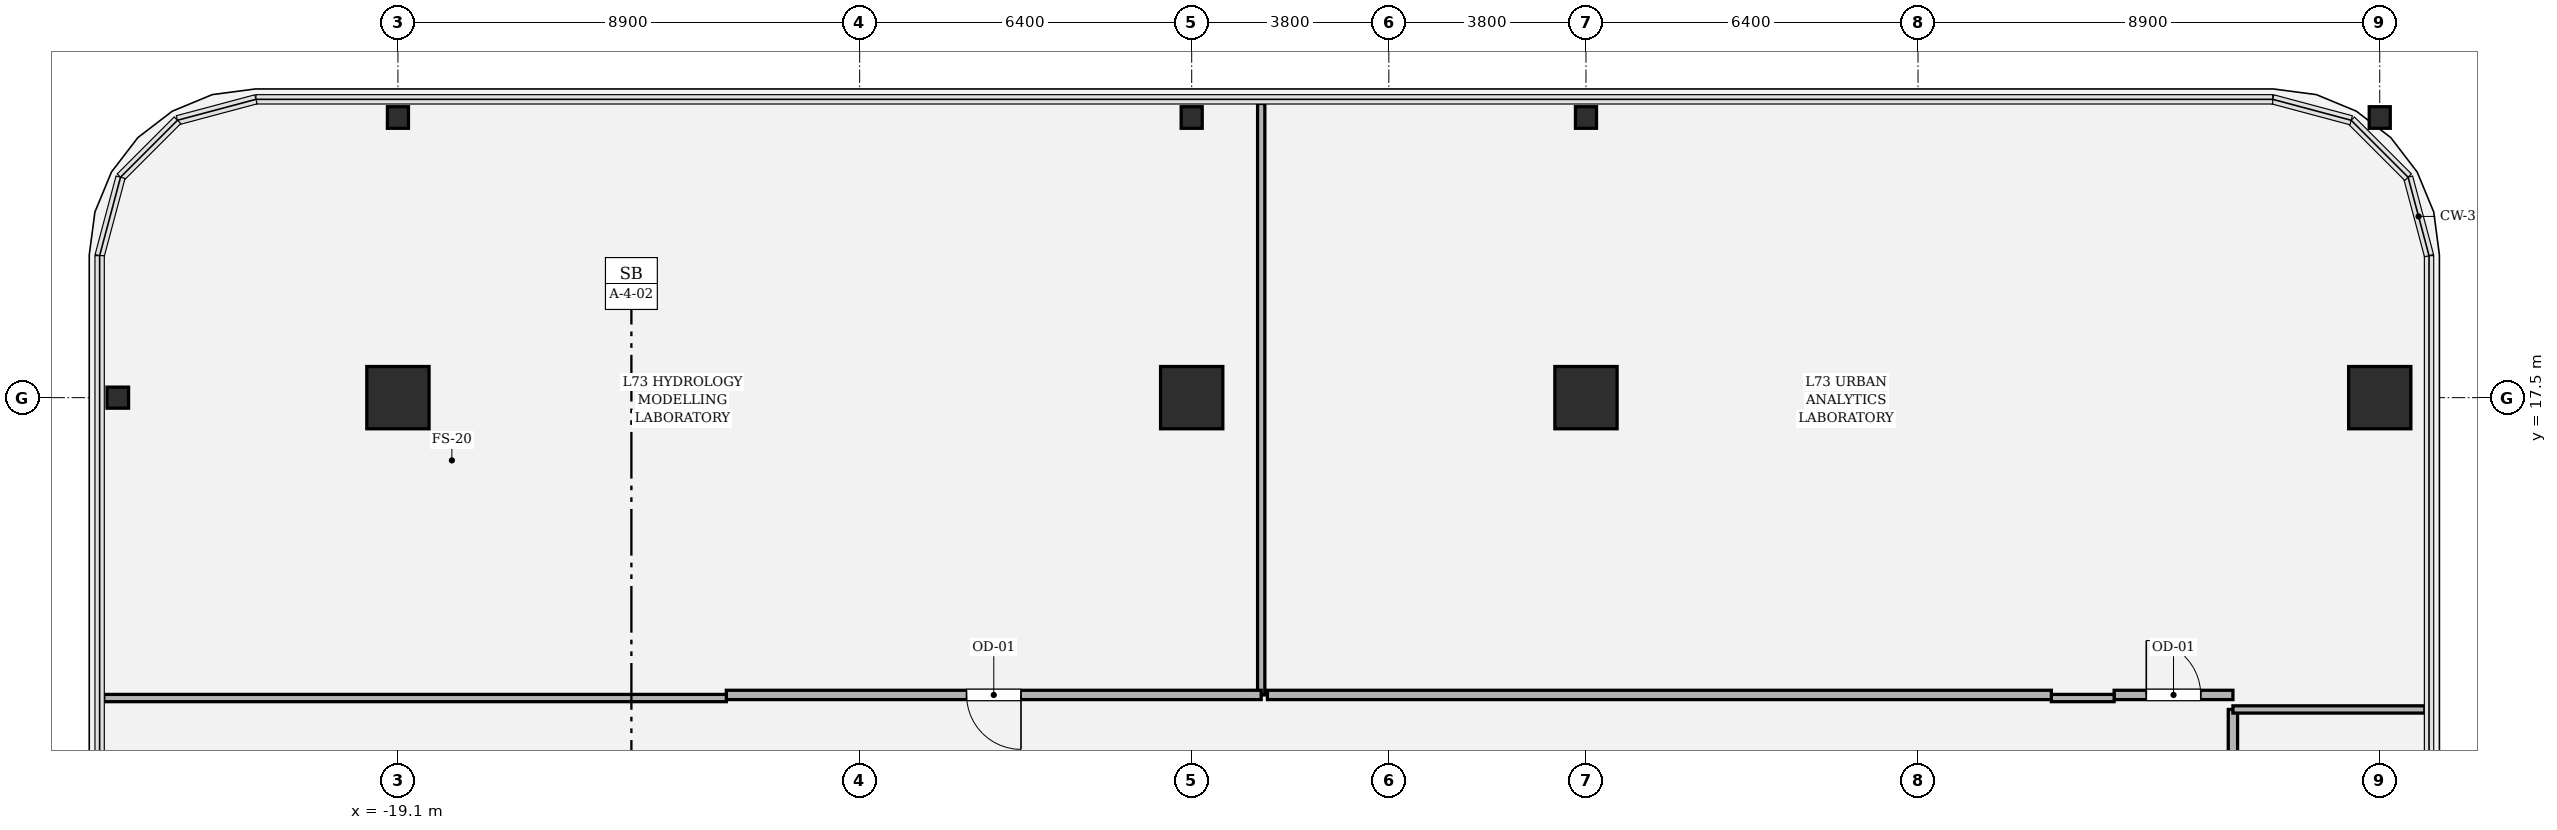
"""IFC4 building model, lengths in metres.
Left out: names, types, materials, properties, quantities, classifications, styles, units other than length and angle.
Written with IfcOpenShell. Run it as: python <this file> out.ifc"""

import sys

from ifc_helpers import new_model, si_unit, direction, frame, frame_2d, origin, origin_2d, place, context, subcontext, project, spatial, rectangle, hollow_rectangle, i_section, extrude, element, fill, save


model = new_model("IFC4")
c1 = context("Model", 3, precision=1e-05, world=origin(), true_north=direction((0.0, 1.0)))
c2 = subcontext(c1, "Body", "Model", "MODEL_VIEW")
j1 = project(units=[si_unit("LENGTHUNIT", "METRE"), si_unit("PLANEANGLEUNIT", "RADIAN")], contexts=[c1])
p1 = place(None, origin())
s1 = spatial("IfcSite", under=j1, at=p1, CompositionType="ELEMENT")
p2 = place(p1, origin())
s2 = spatial("IfcBuilding", under=s1, at=p2, CompositionType="ELEMENT")
p3 = place(p2, frame((0.0, 0.0, 309.0)))
s3 = spatial("IfcBuildingStorey", under=s2, at=p3, CompositionType="ELEMENT", Elevation=309.0)
for number, where, z_axis, x_axis in (
    (1, (19.1, 17.5, 0.0), (0.0, 0.0, 1.0), (1.0, 0.0, 0.0)),
    (2, (3.8, 17.5, 0.0), (0.0, 0.0, 1.0), (1.0, 0.0, 0.0)),
    (3, (-3.8, 17.5, 0.0), (0.0, 0.0, 1.0), (1.0, 0.0, 0.0)),
    (4, (-19.1, 17.5, 0.0), (0.0, 0.0, 1.0), (1.0, 0.0, 0.0)),
):
    element("IfcColumn", number, at=place(p3, frame(where, z_axis=z_axis, x_axis=x_axis)), inside=s3, PredefinedType="COLUMN", context=c2, shape_type="SweptSolid", body=[
        extrude(hollow_rectangle(XDim=1.2, YDim=1.2, WallThickness=0.035, at=origin_2d()), origin(), (0.0, 0.0, 1.0), 4.2),
    ])
for number, where, z_axis, x_axis in (
    (5, (-19.1, 22.9, 0.0), (0.0, 0.0, 1.0), (1.0, 0.0, 0.0)),
    (6, (-3.8, 22.9, 0.0), (0.0, 0.0, 1.0), (1.0, 0.0, 0.0)),
    (7, (3.8, 22.9, 0.0), (0.0, 0.0, 1.0), (1.0, 0.0, 0.0)),
    (8, (19.1, 22.9, 0.0), (0.0, 0.0, 1.0), (1.0, 0.0, 0.0)),
    (9, (-24.5, 17.5, 0.0), (0.0, 0.0, 1.0), (0.0, 1.0, 0.0)),
):
    element("IfcColumn", number, at=place(p3, frame(where, z_axis=z_axis, x_axis=x_axis)), inside=s3, PredefinedType="COLUMN", context=c2, shape_type="SweptSolid", body=[
        extrude(i_section(OverallWidth=0.406, OverallDepth=0.416, WebThickness=0.029, FlangeThickness=0.048, FilletRadius=0.018, at=origin_2d()), origin(), (0.0, 0.0, 1.0), 4.198),
    ])
p4 = place(p3, frame((16.27, -5.67, 0.0), z_axis=(0.0, 0.0, 1.0), x_axis=(0.0, 1.0, 0.0)))
e10 = element("IfcWall", 10, at=p4, inside=s3, PredefinedType="PARTITIONING", context=c2, shape_type="SweptSolid", body=[
    extrude(rectangle(XDim=17.16, YDim=0.18, at=frame_2d((8.58, 0.0))), origin(), (0.0, 0.0, 1.0), 3.394),
])
p5 = place(p4, frame((8.055, 0.0, 0.0)))
e11 = element("IfcOpeningElement", 11, at=p5, cuts=e10, PredefinedType="OPENING", context=c2, shape_type="SweptSolid", body=[
    extrude(rectangle(XDim=1.05, YDim=2.2, at=frame_2d((0.525, 1.1))), frame((0.0, 0.1, 0.0), z_axis=(0.0, -1.0, 0.0), x_axis=(1.0, 0.0, 0.0)), (0.0, 0.0, 1.0), 0.2),
])
p6 = place(p3, frame((16.27, 11.49, 0.0), z_axis=(0.0, 0.0, 1.0), x_axis=(1.0, 0.0, 0.0)))
e12 = element("IfcWall", 12, at=p6, inside=s3, PredefinedType="PARTITIONING", context=c2, shape_type="SweptSolid", body=[
    extrude(rectangle(XDim=3.7, YDim=0.14, at=frame_2d((1.85, 0.0))), origin(), (0.0, 0.0, 1.0), 3.394),
])
p7 = place(p3, frame((-2.46, 23.17, 0.0), z_axis=(0.0, 0.0, 1.0), x_axis=(0.0, -1.0, 0.0)))
e13 = element("IfcWall", 13, at=p7, inside=s3, PredefinedType="PARTITIONING", context=c2, shape_type="SweptSolid", body=[
    extrude(rectangle(XDim=11.4, YDim=0.14, at=frame_2d((5.7, 0.0))), origin(), (0.0, 0.0, 1.0), 2.714),
])
p8 = place(p3, frame((-2.46, 11.77, 0.0), z_axis=(0.0, 0.0, 1.0), x_axis=(-1.0, 0.0, 0.0)))
e14 = element("IfcWall", 14, at=p8, inside=s3, PredefinedType="PARTITIONING", context=c2, shape_type="SweptSolid", body=[
    extrude(rectangle(XDim=10.31, YDim=0.18, at=frame_2d((5.155, 0.0))), origin(), (0.0, 0.0, 1.0), 3.394),
])
p9 = place(p8, frame((4.63, 0.0, 0.0)))
e15 = element("IfcOpeningElement", 15, at=p9, cuts=e14, PredefinedType="OPENING", context=c2, shape_type="SweptSolid", body=[
    extrude(rectangle(XDim=1.05, YDim=2.2, at=frame_2d((0.525, 1.1))), frame((0.0, 0.1, 0.0), z_axis=(0.0, -1.0, 0.0), x_axis=(1.0, 0.0, 0.0)), (0.0, 0.0, 1.0), 0.2),
])
p10 = place(p3, frame((-12.77, 11.71, 0.0), z_axis=(0.0, 0.0, 1.0), x_axis=(-1.0, 0.0, 0.0)))
e16 = element("IfcWall", 16, at=p10, inside=s3, PredefinedType="PARTITIONING", context=c2, shape_type="SweptSolid", body=[
    extrude(rectangle(XDim=12.0, YDim=0.14, at=frame_2d((6.0, 0.0))), origin(), (0.0, 0.0, 1.0), 2.714),
])
p11 = place(p3, frame((16.27, 11.77, 0.0), z_axis=(0.0, 0.0, 1.0), x_axis=(-1.0, 0.0, 0.0)))
e17 = element("IfcWall", 17, at=p11, inside=s3, PredefinedType="PARTITIONING", context=c2, shape_type="SweptSolid", body=[
    extrude(rectangle(XDim=2.29, YDim=0.18, at=frame_2d((1.145, 0.0))), origin(), (0.0, 0.0, 1.0), 3.634),
])
p12 = place(p11, frame((0.62, 0.0, 0.0)))
e18 = element("IfcOpeningElement", 18, at=p12, cuts=e17, PredefinedType="OPENING", context=c2, shape_type="SweptSolid", body=[
    extrude(rectangle(XDim=1.05, YDim=2.2, at=frame_2d((0.525, 1.1))), frame((0.0, 0.1, 0.0), z_axis=(0.0, -1.0, 0.0), x_axis=(1.0, 0.0, 0.0)), (0.0, 0.0, 1.0), 0.2),
])
p13 = place(p3, frame((13.98, 11.71, 0.0), z_axis=(0.0, 0.0, 1.0), x_axis=(-1.0, 0.0, 0.0)))
e19 = element("IfcWall", 19, at=p13, inside=s3, PredefinedType="PARTITIONING", context=c2, shape_type="SweptSolid", body=[
    extrude(rectangle(XDim=1.21, YDim=0.14, at=frame_2d((0.605, 0.0))), origin(), (0.0, 0.0, 1.0), 4.0),
])
p14 = place(p3, frame((12.77, 11.77, 0.0), z_axis=(0.0, 0.0, 1.0), x_axis=(-1.0, 0.0, 0.0)))
e20 = element("IfcWall", 20, at=p14, inside=s3, PredefinedType="PARTITIONING", context=c2, shape_type="SweptSolid", body=[
    extrude(rectangle(XDim=15.11, YDim=0.18, at=frame_2d((7.555, 0.0))), origin(), (0.0, 0.0, 1.0), 3.394),
])
p15 = place(p9, origin())
e21 = element("IfcDoor", 21, at=p15, inside=s3, OperationType="SINGLE_SWING_LEFT", PredefinedType="DOOR", context=c2, shape_type="SweptSolid", body=[
    extrude(rectangle(XDim=1.05, YDim=2.2, at=frame_2d((0.525, 1.1))), frame((0.0, 0.025, 0.0), z_axis=(0.0, -1.0, 0.0), x_axis=(1.0, 0.0, 0.0)), (0.0, 0.0, 1.0), 0.05),
])
fill(e15, e21)
p16 = place(p12, origin())
e22 = element("IfcDoor", 22, at=p16, inside=s3, OperationType="SINGLE_SWING_RIGHT", PredefinedType="DOOR", context=c2, shape_type="SweptSolid", body=[
    extrude(rectangle(XDim=1.05, YDim=2.2, at=frame_2d((0.525, 1.1))), frame((0.0, 0.025, 0.0), z_axis=(0.0, -1.0, 0.0), x_axis=(1.0, 0.0, 0.0)), (0.0, 0.0, 1.0), 0.05),
])
fill(e18, e22)
save(model, sys.argv[1])
